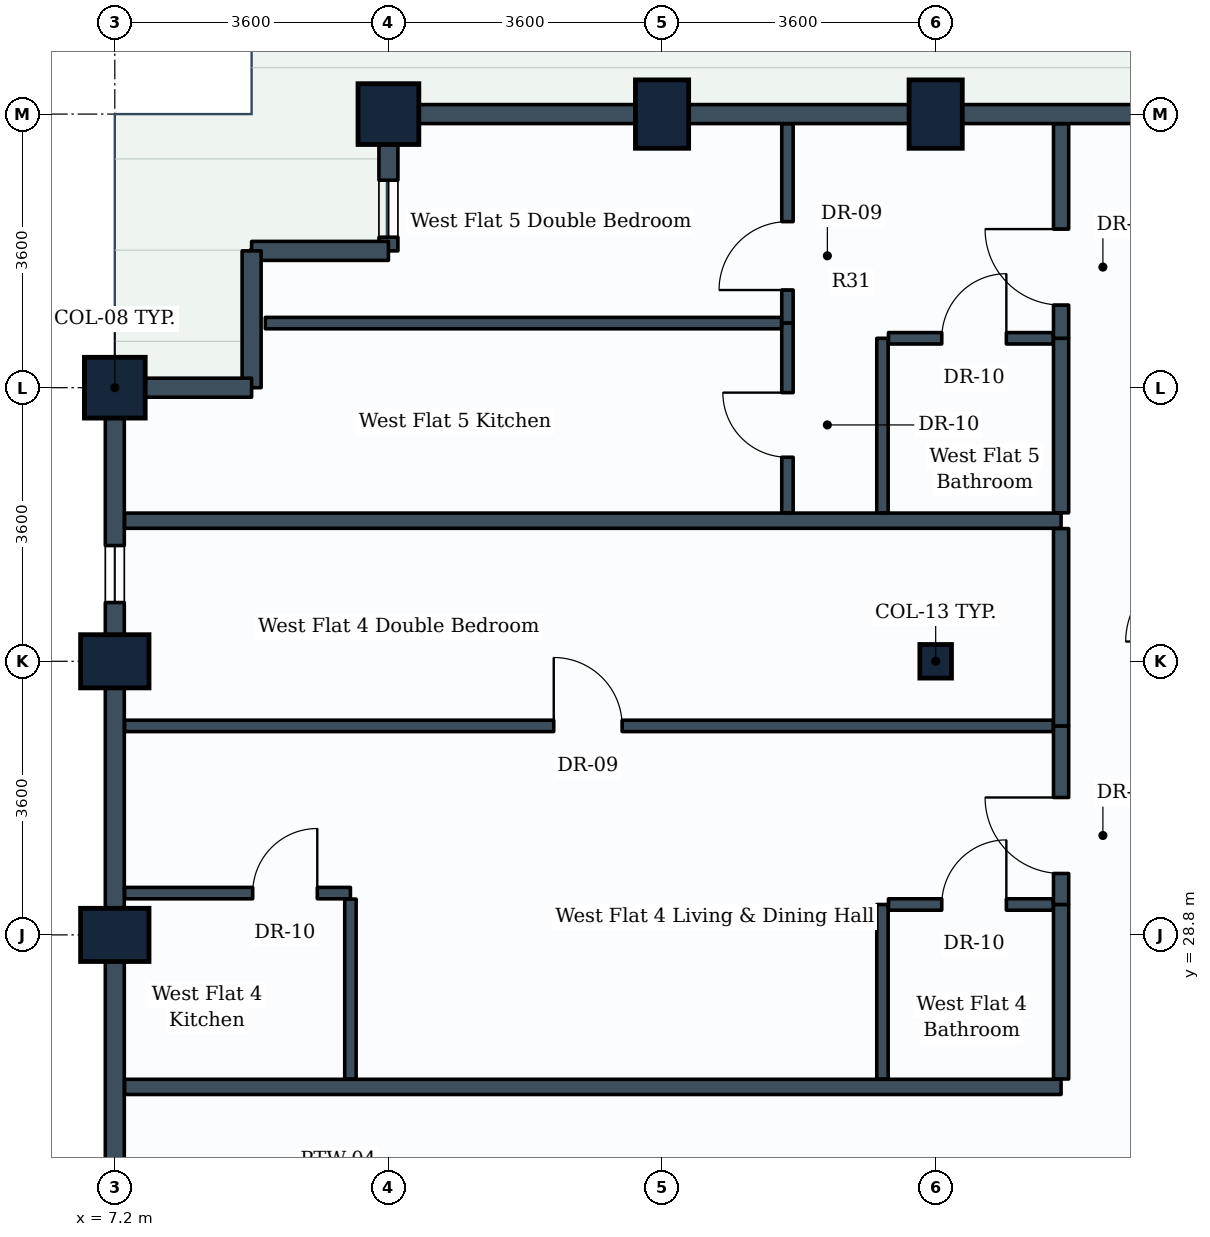
"""IFC4 building model, lengths in metres.
Left out: names, types, materials, properties, quantities, classifications, styles, units other than length and angle.
Written with IfcOpenShell. Run it as: python <this file> out.ifc"""

import sys

from ifc_helpers import new_model, si_unit, direction, frame, frame_2d, origin, origin_2d, place, context, subcontext, project, spatial, rectangle, i_section, extrude, element, fill, save


model = new_model("IFC4")
c1 = context("Model", 3, precision=1e-05, world=origin(), true_north=direction((0.0, 1.0)))
c2 = subcontext(c1, "Body", "Model", "MODEL_VIEW")
j1 = project(units=[si_unit("LENGTHUNIT", "METRE"), si_unit("PLANEANGLEUNIT", "RADIAN")], contexts=[c1])
p1 = place(None, origin())
s1 = spatial("IfcSite", under=j1, at=p1, CompositionType="ELEMENT")
p2 = place(p1, origin())
s2 = spatial("IfcBuilding", under=s1, at=p2, CompositionType="ELEMENT")
p3 = place(p2, frame((0.0, 0.0, 174.8)))
s3 = spatial("IfcBuildingStorey", under=s2, at=p3, CompositionType="ELEMENT", Elevation=174.8)
for number, where, z_axis, x_axis in (
    (1, (7.2, 28.8, 0.0), (0.0, 0.0, 1.0), (0.0, 1.0, 0.0)),
    (2, (7.2, 32.4, 0.0), (0.0, 0.0, 1.0), (0.0, 1.0, 0.0)),
):
    element("IfcColumn", number, at=place(p3, frame(where, z_axis=z_axis, x_axis=x_axis)), inside=s3, PredefinedType="COLUMN", context=c2, shape_type="SweptSolid", body=[
        extrude(rectangle(XDim=0.7, YDim=0.9, at=origin_2d()), origin(), (0.0, 0.0, 1.0), 3.8),
    ])
for number, where, z_axis, x_axis in (
    (3, (7.2, 36.0, 0.0), (0.0, 0.0, 1.0), (0.0, 1.0, 0.0)),
    (4, (10.8, 39.6, 0.0), (0.0, 0.0, 1.0), (1.0, 0.0, 0.0)),
):
    element("IfcColumn", number, at=place(p3, frame(where, z_axis=z_axis, x_axis=x_axis)), inside=s3, PredefinedType="COLUMN", context=c2, shape_type="SweptSolid", body=[
        extrude(rectangle(XDim=0.8, YDim=0.8, at=origin_2d()), origin(), (0.0, 0.0, 1.0), 3.8),
    ])
p4 = place(p3, frame((14.4, 39.6, 0.0), z_axis=(0.0, 0.0, 1.0), x_axis=(1.0, 0.0, 0.0)))
e5 = element("IfcColumn", 5, at=p4, inside=s3, PredefinedType="COLUMN", context=c2, shape_type="SweptSolid", body=[
    extrude(rectangle(XDim=0.7, YDim=0.9, at=origin_2d()), origin(), (0.0, 0.0, 1.0), 3.8),
])
p5 = place(p3, frame((18.0, 32.4, 0.0), z_axis=(0.0, 0.0, 1.0), x_axis=(1.0, 0.0, 0.0)))
e6 = element("IfcColumn", 6, at=p5, inside=s3, PredefinedType="COLUMN", context=c2, shape_type="SweptSolid", body=[
    extrude(i_section(OverallWidth=0.416, OverallDepth=0.442, WebThickness=0.025, FlangeThickness=0.041, FilletRadius=0.015, at=origin_2d()), origin(), (0.0, 0.0, 1.0), 3.8),
])
p6 = place(p3, frame((18.0, 39.6, 0.0), z_axis=(0.0, 0.0, 1.0), x_axis=(1.0, 0.0, 0.0)))
e7 = element("IfcColumn", 7, at=p6, inside=s3, PredefinedType="COLUMN", context=c2, shape_type="SweptSolid", body=[
    extrude(rectangle(XDim=0.7, YDim=0.9, at=origin_2d()), origin(), (0.0, 0.0, 1.0), 3.8),
])
for number, where, z_axis, x_axis in (
    (8, (18.0, 39.6, 0.0), (0.0, 0.0, 1.0), (1.0, 0.0, 0.0)),
    (9, (14.4, 39.6, 0.0), (0.0, 0.0, 1.0), (1.0, 0.0, 0.0)),
):
    element("IfcWall", number, at=place(p3, frame(where, z_axis=z_axis, x_axis=x_axis)), inside=s3, PredefinedType="STANDARD", context=c2, shape_type="SweptSolid", body=[
        extrude(rectangle(XDim=3.6, YDim=0.25, at=frame_2d((1.8, 0.0))), origin(), (0.0, 0.0, 1.0), 2.93),
    ])
p7 = place(p3, frame((10.8, 39.6, 0.0), z_axis=(0.0, 0.0, 1.0), x_axis=(1.0, 0.0, 0.0)))
e10 = element("IfcWall", 10, at=p7, inside=s3, PredefinedType="STANDARD", context=c2, shape_type="SweptSolid", body=[
    extrude(rectangle(XDim=3.6, YDim=0.25, at=frame_2d((1.8, 0.0))), origin(), (0.0, 0.0, 1.0), 2.93),
])
p8 = place(p3, frame((10.8, 37.8, 0.0), z_axis=(0.0, 0.0, 1.0), x_axis=(0.0, 1.0, 0.0)))
e11 = element("IfcWall", 11, at=p8, inside=s3, PredefinedType="STANDARD", context=c2, shape_type="SweptSolid", body=[
    extrude(rectangle(XDim=1.8, YDim=0.25, at=frame_2d((0.9, 0.0))), origin(), (0.0, 0.0, 1.0), 2.93),
])
p9 = place(p8, frame((0.18, 0.0, 0.85)))
e12 = element("IfcOpeningElement", 12, at=p9, cuts=e11, PredefinedType="OPENING", context=c2, shape_type="SweptSolid", body=[
    extrude(rectangle(XDim=0.75, YDim=1.05, at=frame_2d((0.375, 0.525))), frame((0.0, 0.135, 0.0), z_axis=(0.0, -1.0, 0.0), x_axis=(1.0, 0.0, 0.0)), (0.0, 0.0, 1.0), 0.27),
])
for number, where, z_axis, x_axis in (
    (13, (9.0, 37.8, 0.0), (0.0, 0.0, 1.0), (1.0, 0.0, 0.0)),
    (14, (9.0, 36.0, 0.0), (0.0, 0.0, 1.0), (0.0, 1.0, 0.0)),
):
    element("IfcWall", number, at=place(p3, frame(where, z_axis=z_axis, x_axis=x_axis)), inside=s3, PredefinedType="STANDARD", context=c2, shape_type="SweptSolid", body=[
        extrude(rectangle(XDim=1.8, YDim=0.25, at=frame_2d((0.9, 0.0))), origin(), (0.0, 0.0, 1.0), 3.535),
    ])
p10 = place(p3, frame((7.2, 36.0, 0.0), z_axis=(0.0, 0.0, 1.0), x_axis=(1.0, 0.0, 0.0)))
e15 = element("IfcWall", 15, at=p10, inside=s3, PredefinedType="STANDARD", context=c2, shape_type="SweptSolid", body=[
    extrude(rectangle(XDim=1.8, YDim=0.25, at=frame_2d((0.9, 0.0))), origin(), (0.0, 0.0, 1.0), 2.93),
])
p11 = place(p3, frame((7.2, 32.4, 0.0), z_axis=(0.0, 0.0, 1.0), x_axis=(0.0, 1.0, 0.0)))
e16 = element("IfcWall", 16, at=p11, inside=s3, PredefinedType="STANDARD", context=c2, shape_type="SweptSolid", body=[
    extrude(rectangle(XDim=3.6, YDim=0.25, at=frame_2d((1.8, 0.0))), origin(), (0.0, 0.0, 1.0), 2.93),
])
p12 = place(p11, frame((0.773, 0.0, 0.85)))
e17 = element("IfcOpeningElement", 17, at=p12, cuts=e16, PredefinedType="OPENING", context=c2, shape_type="SweptSolid", body=[
    extrude(rectangle(XDim=0.75, YDim=1.05, at=frame_2d((0.375, 0.525))), frame((0.0, 0.135, 0.0), z_axis=(0.0, -1.0, 0.0), x_axis=(1.0, 0.0, 0.0)), (0.0, 0.0, 1.0), 0.27),
])
p13 = place(p3, frame((7.2, 28.8, 0.0), z_axis=(0.0, 0.0, 1.0), x_axis=(0.0, 1.0, 0.0)))
e18 = element("IfcWall", 18, at=p13, inside=s3, PredefinedType="STANDARD", context=c2, shape_type="SweptSolid", body=[
    extrude(rectangle(XDim=3.6, YDim=0.25, at=frame_2d((1.8, 0.0))), origin(), (0.0, 0.0, 1.0), 2.93),
])
p14 = place(p3, frame((7.2, 25.2, 0.0), z_axis=(0.0, 0.0, 1.0), x_axis=(0.0, 1.0, 0.0)))
e19 = element("IfcWall", 19, at=p14, inside=s3, PredefinedType="STANDARD", context=c2, shape_type="SweptSolid", body=[
    extrude(rectangle(XDim=3.6, YDim=0.25, at=frame_2d((1.8, 0.0))), origin(), (0.0, 0.0, 1.0), 2.93),
])
for number, where, z_axis, x_axis in (
    (20, (7.329, 26.8, 0.0), (0.0, 0.0, 1.0), (1.0, 0.0, 0.0)),
    (21, (7.329, 34.25, 0.0), (0.0, 0.0, 1.0), (1.0, 0.0, 0.0)),
):
    element("IfcWall", number, at=place(p3, frame(where, z_axis=z_axis, x_axis=x_axis)), inside=s3, PredefinedType="PARTITIONING", context=c2, shape_type="SweptSolid", body=[
        extrude(rectangle(XDim=12.321, YDim=0.2, at=frame_2d((6.16, 0.0))), origin(), (0.0, 0.0, 1.0), 2.93),
    ])
p15 = place(p3, frame((19.65, 26.904, 0.0), z_axis=(0.0, 0.0, 1.0), x_axis=(0.0, 1.0, 0.0)))
e22 = element("IfcWall", 22, at=p15, inside=s3, PredefinedType="PARTITIONING", context=c2, shape_type="SweptSolid", body=[
    extrude(rectangle(XDim=2.296, YDim=0.2, at=frame_2d((1.148, 0.0))), origin(), (0.0, 0.0, 1.0), 3.22),
])
p16 = place(p3, frame((17.3, 26.904, 0.0), z_axis=(0.0, 0.0, 1.0), x_axis=(0.0, 1.0, 0.0)))
e23 = element("IfcWall", 23, at=p16, inside=s3, PredefinedType="PARTITIONING", context=c2, shape_type="SweptSolid", body=[
    extrude(rectangle(XDim=2.296, YDim=0.15, at=frame_2d((1.148, 0.0))), origin(), (0.0, 0.0, 1.0), 3.22),
])
p17 = place(p3, frame((17.379, 29.2, 0.0), z_axis=(0.0, 0.0, 1.0), x_axis=(1.0, 0.0, 0.0)))
e24 = element("IfcWall", 24, at=p17, inside=s3, PredefinedType="PARTITIONING", context=c2, shape_type="SweptSolid", body=[
    extrude(rectangle(XDim=2.167, YDim=0.15, at=frame_2d((1.083, 0.0))), origin(), (0.0, 0.0, 1.0), 3.17),
])
p18 = place(p17, frame((0.701, 0.0, 0.0)))
e25 = element("IfcOpeningElement", 25, at=p18, cuts=e24, PredefinedType="OPENING", context=c2, shape_type="SweptSolid", body=[
    extrude(rectangle(XDim=0.85, YDim=2.1, at=frame_2d((0.425, 1.05))), frame((0.0, 0.085, 0.0), z_axis=(0.0, -1.0, 0.0), x_axis=(1.0, 0.0, 0.0)), (0.0, 0.0, 1.0), 0.17),
])
p19 = place(p3, frame((19.65, 29.2, 0.0), z_axis=(0.0, 0.0, 1.0), x_axis=(0.0, 1.0, 0.0)))
e26 = element("IfcWall", 26, at=p19, inside=s3, PredefinedType="PARTITIONING", context=c2, shape_type="SweptSolid", body=[
    extrude(rectangle(XDim=2.35, YDim=0.2, at=frame_2d((1.175, 0.0))), origin(), (0.0, 0.0, 1.0), 3.535),
])
p20 = place(p19, frame((0.408, 0.0, 0.0)))
e27 = element("IfcOpeningElement", 27, at=p20, cuts=e26, PredefinedType="OPENING", context=c2, shape_type="SweptSolid", body=[
    extrude(rectangle(XDim=1.0, YDim=2.1, at=frame_2d((0.5, 1.05))), frame((0.0, 0.11, 0.0), z_axis=(0.0, -1.0, 0.0), x_axis=(1.0, 0.0, 0.0)), (0.0, 0.0, 1.0), 0.22),
])
p21 = place(p3, frame((19.65, 31.55, 0.0), z_axis=(0.0, 0.0, 1.0), x_axis=(0.0, 1.0, 0.0)))
e28 = element("IfcWall", 28, at=p21, inside=s3, PredefinedType="PARTITIONING", context=c2, shape_type="SweptSolid", body=[
    extrude(rectangle(XDim=2.596, YDim=0.2, at=frame_2d((1.298, 0.0))), origin(), (0.0, 0.0, 1.0), 3.17),
])
p22 = place(p3, frame((7.329, 31.55, 0.0), z_axis=(0.0, 0.0, 1.0), x_axis=(1.0, 0.0, 0.0)))
e29 = element("IfcWall", 29, at=p22, inside=s3, PredefinedType="PARTITIONING", context=c2, shape_type="SweptSolid", body=[
    extrude(rectangle(XDim=12.217, YDim=0.15, at=frame_2d((6.108, 0.0))), origin(), (0.0, 0.0, 1.0), 2.93),
])
p23 = place(p22, frame((5.646, 0.0, 0.0)))
e30 = element("IfcOpeningElement", 30, at=p23, cuts=e29, PredefinedType="OPENING", context=c2, shape_type="SweptSolid", body=[
    extrude(rectangle(XDim=0.9, YDim=2.1, at=frame_2d((0.45, 1.05))), frame((0.0, 0.085, 0.0), z_axis=(0.0, -1.0, 0.0), x_axis=(1.0, 0.0, 0.0)), (0.0, 0.0, 1.0), 0.17),
])
p24 = place(p3, frame((7.329, 29.35, 0.0), z_axis=(0.0, 0.0, 1.0), x_axis=(1.0, 0.0, 0.0)))
e31 = element("IfcWall", 31, at=p24, inside=s3, PredefinedType="PARTITIONING", context=c2, shape_type="SweptSolid", body=[
    extrude(rectangle(XDim=2.971, YDim=0.15, at=frame_2d((1.485, 0.0))), origin(), (0.0, 0.0, 1.0), 2.93),
])
p25 = place(p24, frame((1.685, 0.0, 0.0)))
e32 = element("IfcOpeningElement", 32, at=p25, cuts=e31, PredefinedType="OPENING", context=c2, shape_type="SweptSolid", body=[
    extrude(rectangle(XDim=0.85, YDim=2.1, at=frame_2d((0.425, 1.05))), frame((0.0, 0.085, 0.0), z_axis=(0.0, -1.0, 0.0), x_axis=(1.0, 0.0, 0.0)), (0.0, 0.0, 1.0), 0.17),
])
p26 = place(p3, frame((10.3, 26.904, 0.0), z_axis=(0.0, 0.0, 1.0), x_axis=(0.0, 1.0, 0.0)))
e33 = element("IfcWall", 33, at=p26, inside=s3, PredefinedType="PARTITIONING", context=c2, shape_type="SweptSolid", body=[
    extrude(rectangle(XDim=2.367, YDim=0.15, at=frame_2d((1.184, 0.0))), origin(), (0.0, 0.0, 1.0), 3.22),
])
p27 = place(p3, frame((19.65, 34.354, 0.0), z_axis=(0.0, 0.0, 1.0), x_axis=(0.0, 1.0, 0.0)))
e34 = element("IfcWall", 34, at=p27, inside=s3, PredefinedType="PARTITIONING", context=c2, shape_type="SweptSolid", body=[
    extrude(rectangle(XDim=2.296, YDim=0.2, at=frame_2d((1.148, 0.0))), origin(), (0.0, 0.0, 1.0), 3.535),
])
p28 = place(p3, frame((17.3, 34.354, 0.0), z_axis=(0.0, 0.0, 1.0), x_axis=(0.0, 1.0, 0.0)))
e35 = element("IfcWall", 35, at=p28, inside=s3, PredefinedType="PARTITIONING", context=c2, shape_type="SweptSolid", body=[
    extrude(rectangle(XDim=2.296, YDim=0.15, at=frame_2d((1.148, 0.0))), origin(), (0.0, 0.0, 1.0), 3.535),
])
p29 = place(p3, frame((17.379, 36.65, 0.0), z_axis=(0.0, 0.0, 1.0), x_axis=(1.0, 0.0, 0.0)))
e36 = element("IfcWall", 36, at=p29, inside=s3, PredefinedType="PARTITIONING", context=c2, shape_type="SweptSolid", body=[
    extrude(rectangle(XDim=2.167, YDim=0.15, at=frame_2d((1.083, 0.0))), origin(), (0.0, 0.0, 1.0), 3.17),
])
p30 = place(p29, frame((0.701, 0.0, 0.0)))
e37 = element("IfcOpeningElement", 37, at=p30, cuts=e36, PredefinedType="OPENING", context=c2, shape_type="SweptSolid", body=[
    extrude(rectangle(XDim=0.85, YDim=2.1, at=frame_2d((0.425, 1.05))), frame((0.0, 0.085, 0.0), z_axis=(0.0, -1.0, 0.0), x_axis=(1.0, 0.0, 0.0)), (0.0, 0.0, 1.0), 0.17),
])
p31 = place(p3, frame((19.65, 36.65, 0.0), z_axis=(0.0, 0.0, 1.0), x_axis=(0.0, 1.0, 0.0)))
e38 = element("IfcWall", 38, at=p31, inside=s3, PredefinedType="PARTITIONING", context=c2, shape_type="SweptSolid", body=[
    extrude(rectangle(XDim=2.821, YDim=0.2, at=frame_2d((1.411, 0.0))), origin(), (0.0, 0.0, 1.0), 2.93),
])
p32 = place(p31, frame((0.437, 0.0, 0.0)))
e39 = element("IfcOpeningElement", 39, at=p32, cuts=e38, PredefinedType="OPENING", context=c2, shape_type="SweptSolid", body=[
    extrude(rectangle(XDim=1.0, YDim=2.1, at=frame_2d((0.5, 1.05))), frame((0.0, 0.11, 0.0), z_axis=(0.0, -1.0, 0.0), x_axis=(1.0, 0.0, 0.0)), (0.0, 0.0, 1.0), 0.22),
])
p33 = place(p3, frame((16.05, 36.85, 0.0), z_axis=(0.0, 0.0, 1.0), x_axis=(0.0, 1.0, 0.0)))
e40 = element("IfcWall", 40, at=p33, inside=s3, PredefinedType="PARTITIONING", context=c2, shape_type="SweptSolid", body=[
    extrude(rectangle(XDim=2.621, YDim=0.15, at=frame_2d((1.311, 0.0))), origin(), (0.0, 0.0, 1.0), 2.93),
])
p34 = place(p33, frame((0.435, 0.0, 0.0)))
e41 = element("IfcOpeningElement", 41, at=p34, cuts=e40, PredefinedType="OPENING", context=c2, shape_type="SweptSolid", body=[
    extrude(rectangle(XDim=0.9, YDim=2.1, at=frame_2d((0.45, 1.05))), frame((0.0, 0.085, 0.0), z_axis=(0.0, -1.0, 0.0), x_axis=(1.0, 0.0, 0.0)), (0.0, 0.0, 1.0), 0.17),
])
p35 = place(p3, frame((16.05, 34.354, 0.0), z_axis=(0.0, 0.0, 1.0), x_axis=(0.0, 1.0, 0.0)))
e42 = element("IfcWall", 42, at=p35, inside=s3, PredefinedType="PARTITIONING", context=c2, shape_type="SweptSolid", body=[
    extrude(rectangle(XDim=2.496, YDim=0.15, at=frame_2d((1.248, 0.0))), origin(), (0.0, 0.0, 1.0), 3.535),
])
p36 = place(p35, frame((0.731, 0.0, 0.0)))
e43 = element("IfcOpeningElement", 43, at=p36, cuts=e42, PredefinedType="OPENING", context=c2, shape_type="SweptSolid", body=[
    extrude(rectangle(XDim=0.85, YDim=2.1, at=frame_2d((0.425, 1.05))), frame((0.0, 0.085, 0.0), z_axis=(0.0, -1.0, 0.0), x_axis=(1.0, 0.0, 0.0)), (0.0, 0.0, 1.0), 0.17),
])
p37 = place(p3, frame((9.18, 36.85, 0.0), z_axis=(0.0, 0.0, 1.0), x_axis=(1.0, 0.0, 0.0)))
e44 = element("IfcWall", 44, at=p37, inside=s3, PredefinedType="PARTITIONING", context=c2, shape_type="SweptSolid", body=[
    extrude(rectangle(XDim=6.791, YDim=0.15, at=frame_2d((3.396, 0.0))), origin(), (0.0, 0.0, 1.0), 3.535),
])
p38 = place(p18, origin())
e45 = element("IfcDoor", 45, at=p38, inside=s3, OperationType="SINGLE_SWING_RIGHT", PredefinedType="DOOR", context=c2, shape_type="SweptSolid", body=[
    extrude(rectangle(XDim=0.85, YDim=2.1, at=frame_2d((0.425, 1.05))), frame((0.0, 0.025, 0.0), z_axis=(0.0, -1.0, 0.0), x_axis=(1.0, 0.0, 0.0)), (0.0, 0.0, 1.0), 0.05),
])
fill(e25, e45)
p39 = place(p20, origin())
e46 = element("IfcDoor", 46, at=p39, inside=s3, OperationType="SINGLE_SWING_RIGHT", PredefinedType="DOOR", context=c2, shape_type="SweptSolid", body=[
    extrude(rectangle(XDim=1.0, YDim=2.1, at=frame_2d((0.5, 1.05))), frame((0.0, 0.025, 0.0), z_axis=(0.0, -1.0, 0.0), x_axis=(1.0, 0.0, 0.0)), (0.0, 0.0, 1.0), 0.05),
])
fill(e27, e46)
p40 = place(p23, origin())
e47 = element("IfcDoor", 47, at=p40, inside=s3, OperationType="SINGLE_SWING_LEFT", PredefinedType="DOOR", context=c2, shape_type="SweptSolid", body=[
    extrude(rectangle(XDim=0.9, YDim=2.1, at=frame_2d((0.45, 1.05))), frame((0.0, 0.025, 0.0), z_axis=(0.0, -1.0, 0.0), x_axis=(1.0, 0.0, 0.0)), (0.0, 0.0, 1.0), 0.05),
])
fill(e30, e47)
p41 = place(p25, origin())
e48 = element("IfcDoor", 48, at=p41, inside=s3, OperationType="SINGLE_SWING_RIGHT", PredefinedType="DOOR", context=c2, shape_type="SweptSolid", body=[
    extrude(rectangle(XDim=0.85, YDim=2.1, at=frame_2d((0.425, 1.05))), frame((0.0, 0.025, 0.0), z_axis=(0.0, -1.0, 0.0), x_axis=(1.0, 0.0, 0.0)), (0.0, 0.0, 1.0), 0.05),
])
fill(e32, e48)
p42 = place(p30, origin())
e49 = element("IfcDoor", 49, at=p42, inside=s3, OperationType="SINGLE_SWING_RIGHT", PredefinedType="DOOR", context=c2, shape_type="SweptSolid", body=[
    extrude(rectangle(XDim=0.85, YDim=2.1, at=frame_2d((0.425, 1.05))), frame((0.0, 0.025, 0.0), z_axis=(0.0, -1.0, 0.0), x_axis=(1.0, 0.0, 0.0)), (0.0, 0.0, 1.0), 0.05),
])
fill(e37, e49)
p43 = place(p32, origin())
e50 = element("IfcDoor", 50, at=p43, inside=s3, OperationType="SINGLE_SWING_RIGHT", PredefinedType="DOOR", context=c2, shape_type="SweptSolid", body=[
    extrude(rectangle(XDim=1.0, YDim=2.1, at=frame_2d((0.5, 1.05))), frame((0.0, 0.025, 0.0), z_axis=(0.0, -1.0, 0.0), x_axis=(1.0, 0.0, 0.0)), (0.0, 0.0, 1.0), 0.05),
])
fill(e39, e50)
p44 = place(p34, origin())
e51 = element("IfcDoor", 51, at=p44, inside=s3, OperationType="SINGLE_SWING_LEFT", PredefinedType="DOOR", context=c2, shape_type="SweptSolid", body=[
    extrude(rectangle(XDim=0.9, YDim=2.1, at=frame_2d((0.45, 1.05))), frame((0.0, 0.025, 0.0), z_axis=(0.0, -1.0, 0.0), x_axis=(1.0, 0.0, 0.0)), (0.0, 0.0, 1.0), 0.05),
])
fill(e41, e51)
p45 = place(p36, origin())
e52 = element("IfcDoor", 52, at=p45, inside=s3, OperationType="SINGLE_SWING_RIGHT", PredefinedType="DOOR", context=c2, shape_type="SweptSolid", body=[
    extrude(rectangle(XDim=0.85, YDim=2.1, at=frame_2d((0.425, 1.05))), frame((0.0, 0.025, 0.0), z_axis=(0.0, -1.0, 0.0), x_axis=(1.0, 0.0, 0.0)), (0.0, 0.0, 1.0), 0.05),
])
fill(e43, e52)
p46 = place(p12, origin())
e53 = element("IfcWindow", 53, at=p46, inside=s3, PartitioningType="SINGLE_PANEL", PredefinedType="WINDOW", context=c2, shape_type="SweptSolid", body=[
    extrude(rectangle(XDim=0.75, YDim=1.05, at=frame_2d((0.375, 0.525))), frame((0.0, 0.03, 0.0), z_axis=(0.0, -1.0, 0.0), x_axis=(1.0, 0.0, 0.0)), (0.0, 0.0, 1.0), 0.06),
])
fill(e17, e53)
p47 = place(p9, origin())
e54 = element("IfcWindow", 54, at=p47, inside=s3, PartitioningType="SINGLE_PANEL", PredefinedType="WINDOW", context=c2, shape_type="SweptSolid", body=[
    extrude(rectangle(XDim=0.75, YDim=1.05, at=frame_2d((0.375, 0.525))), frame((0.0, 0.03, 0.0), z_axis=(0.0, -1.0, 0.0), x_axis=(1.0, 0.0, 0.0)), (0.0, 0.0, 1.0), 0.06),
])
fill(e12, e54)
save(model, sys.argv[1])
